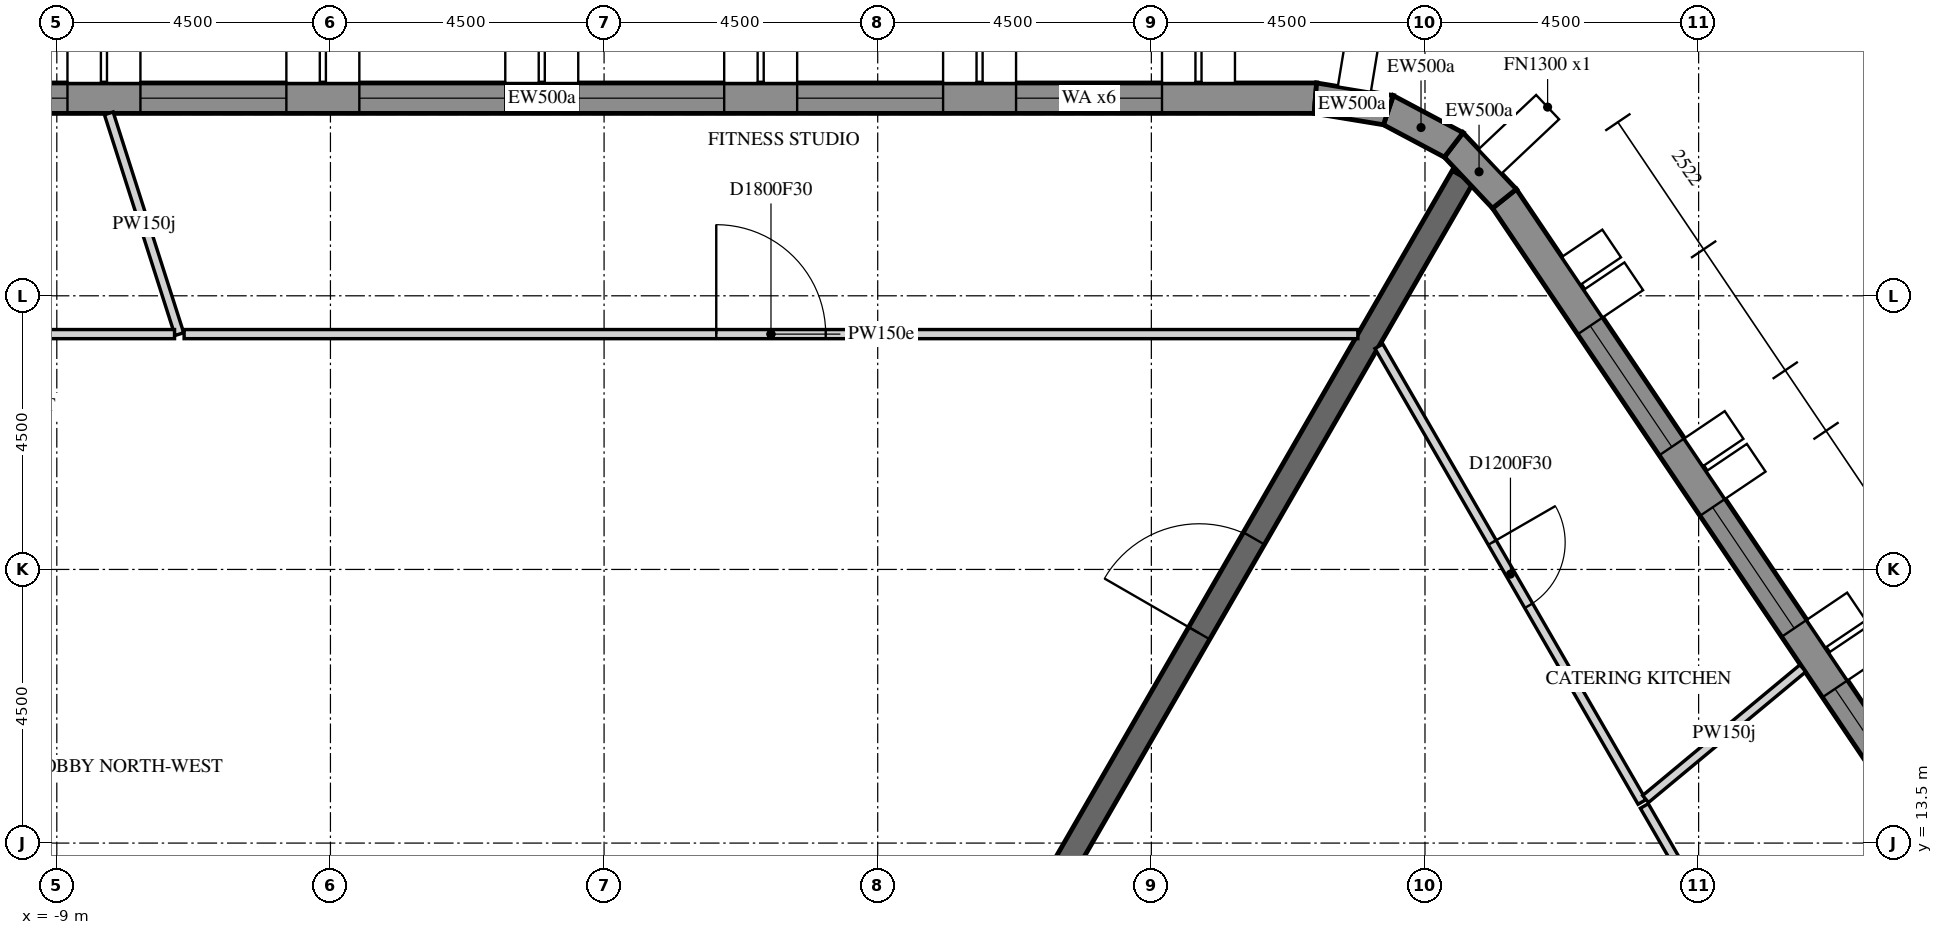
"""IFC4 building model, lengths in metres.
Left out: names, types, materials, properties, quantities, classifications, styles, units other than length and angle.
Written with IfcOpenShell. Run it as: python <this file> out.ifc"""

import sys

from ifc_helpers import new_model, si_unit, direction, frame, frame_2d, origin, place, context, subcontext, project, spatial, polyline, rectangle, outline, extrude, element, fill, save


model = new_model("IFC4")
c1 = context("Model", 3, precision=1e-05, world=origin(), true_north=direction((0.0, 1.0)))
c2 = subcontext(c1, "Body", "Model", "MODEL_VIEW")
j1 = project(units=[si_unit("LENGTHUNIT", "METRE"), si_unit("PLANEANGLEUNIT", "RADIAN")], contexts=[c1])
p1 = place(None, origin())
s1 = spatial("IfcSite", under=j1, at=p1, CompositionType="ELEMENT")
p2 = place(p1, origin())
s2 = spatial("IfcBuilding", under=s1, at=p2, CompositionType="ELEMENT")
p3 = place(p2, frame((0.0, 0.0, 338.1)))
s3 = spatial("IfcBuildingStorey", under=s2, at=p3, CompositionType="ELEMENT", Elevation=338.1)
p4 = place(p3, frame((11.698, 25.75, -0.3), z_axis=(0.0, 0.0, 1.0), x_axis=(-1.0, 0.0, 0.0)))
e1 = element("IfcWall", 1, at=p4, inside=s3, PredefinedType="SOLIDWALL", context=c2, shape_type="SweptSolid", body=[
    extrude(outline(polyline([(-0.021, -0.25), (25.468, -0.25), (25.421, 0.25), (0.021, 0.25), (-0.021, -0.25)])), origin(), (0.0, 0.0, 1.0), 5.4),
])
p5 = place(p4, frame((2.522, 0.0, 1.2)))
e2 = element("IfcOpeningElement", 2, at=p5, cuts=e1, PredefinedType="OPENING", context=c2, shape_type="SweptSolid", body=[
    extrude(rectangle(XDim=2.4, YDim=3.6, at=frame_2d((1.2, 1.8))), frame((0.0, 0.26, 0.0), z_axis=(0.0, -1.0, 0.0), x_axis=(1.0, 0.0, 0.0)), (0.0, 0.0, 1.0), 0.52),
])
p6 = place(p4, frame((6.122, 0.0, 1.2)))
e3 = element("IfcOpeningElement", 3, at=p6, cuts=e1, PredefinedType="OPENING", context=c2, shape_type="SweptSolid", body=[
    extrude(rectangle(XDim=2.4, YDim=3.6, at=frame_2d((1.2, 1.8))), frame((0.0, 0.26, 0.0), z_axis=(0.0, -1.0, 0.0), x_axis=(1.0, 0.0, 0.0)), (0.0, 0.0, 1.0), 0.52),
])
p7 = place(p4, frame((9.722, 0.0, 1.2)))
e4 = element("IfcOpeningElement", 4, at=p7, cuts=e1, PredefinedType="OPENING", context=c2, shape_type="SweptSolid", body=[
    extrude(rectangle(XDim=2.4, YDim=3.6, at=frame_2d((1.2, 1.8))), frame((0.0, 0.26, 0.0), z_axis=(0.0, -1.0, 0.0), x_axis=(1.0, 0.0, 0.0)), (0.0, 0.0, 1.0), 0.52),
])
p8 = place(p4, frame((13.323, 0.0, 1.2)))
e5 = element("IfcOpeningElement", 5, at=p8, cuts=e1, PredefinedType="OPENING", context=c2, shape_type="SweptSolid", body=[
    extrude(rectangle(XDim=2.4, YDim=3.6, at=frame_2d((1.2, 1.8))), frame((0.0, 0.26, 0.0), z_axis=(0.0, -1.0, 0.0), x_axis=(1.0, 0.0, 0.0)), (0.0, 0.0, 1.0), 0.52),
])
p9 = place(p4, frame((16.922, 0.0, 1.2)))
e6 = element("IfcOpeningElement", 6, at=p9, cuts=e1, PredefinedType="OPENING", context=c2, shape_type="SweptSolid", body=[
    extrude(rectangle(XDim=2.4, YDim=3.6, at=frame_2d((1.2, 1.8))), frame((0.0, 0.26, 0.0), z_axis=(0.0, -1.0, 0.0), x_axis=(1.0, 0.0, 0.0)), (0.0, 0.0, 1.0), 0.52),
])
p10 = place(p4, frame((20.522, 0.0, 1.2)))
e7 = element("IfcOpeningElement", 7, at=p10, cuts=e1, PredefinedType="OPENING", context=c2, shape_type="SweptSolid", body=[
    extrude(rectangle(XDim=2.4, YDim=3.6, at=frame_2d((1.2, 1.8))), frame((0.0, 0.26, 0.0), z_axis=(0.0, -1.0, 0.0), x_axis=(1.0, 0.0, 0.0)), (0.0, 0.0, 1.0), 0.52),
])
p11 = place(p3, frame((29.035, 3.002, -0.3), z_axis=(0.0, 0.0, 1.0), x_axis=(-0.559195809204, 0.829035612606, 0.0)))
e8 = element("IfcWall", 8, at=p11, inside=s3, PredefinedType="SOLIDWALL", context=c2, shape_type="SweptSolid", body=[
    extrude(outline(polyline([(-0.023, -0.25), (25.465, -0.25), (25.424, 0.25), (0.023, 0.25), (-0.023, -0.25)])), origin(), (0.0, 0.0, 1.0), 5.4),
])
p12 = place(p11, frame((2.522, 0.0, 1.2)))
e9 = element("IfcOpeningElement", 9, at=p12, cuts=e8, PredefinedType="OPENING", context=c2, shape_type="SweptSolid", body=[
    extrude(rectangle(XDim=2.4, YDim=3.6, at=frame_2d((1.2, 1.8))), frame((0.0, 0.26, 0.0), z_axis=(0.0, -1.0, 0.0), x_axis=(1.0, 0.0, 0.0)), (0.0, 0.0, 1.0), 0.52),
])
p13 = place(p11, frame((6.122, 0.0, 1.2)))
e10 = element("IfcOpeningElement", 10, at=p13, cuts=e8, PredefinedType="OPENING", context=c2, shape_type="SweptSolid", body=[
    extrude(rectangle(XDim=2.4, YDim=3.6, at=frame_2d((1.2, 1.8))), frame((0.0, 0.26, 0.0), z_axis=(0.0, -1.0, 0.0), x_axis=(1.0, 0.0, 0.0)), (0.0, 0.0, 1.0), 0.52),
])
p14 = place(p11, frame((9.722, 0.0, 1.2)))
e11 = element("IfcOpeningElement", 11, at=p14, cuts=e8, PredefinedType="OPENING", context=c2, shape_type="SweptSolid", body=[
    extrude(rectangle(XDim=2.4, YDim=3.6, at=frame_2d((1.2, 1.8))), frame((0.0, 0.26, 0.0), z_axis=(0.0, -1.0, 0.0), x_axis=(1.0, 0.0, 0.0)), (0.0, 0.0, 1.0), 0.52),
])
p15 = place(p11, frame((13.323, 0.0, 1.2)))
e12 = element("IfcOpeningElement", 12, at=p15, cuts=e8, PredefinedType="OPENING", context=c2, shape_type="SweptSolid", body=[
    extrude(rectangle(XDim=2.4, YDim=3.6, at=frame_2d((1.2, 1.8))), frame((0.0, 0.26, 0.0), z_axis=(0.0, -1.0, 0.0), x_axis=(1.0, 0.0, 0.0)), (0.0, 0.0, 1.0), 0.52),
])
p16 = place(p11, frame((16.922, 0.0, 1.2)))
e13 = element("IfcOpeningElement", 13, at=p16, cuts=e8, PredefinedType="OPENING", context=c2, shape_type="SweptSolid", body=[
    extrude(rectangle(XDim=2.4, YDim=3.6, at=frame_2d((1.2, 1.8))), frame((0.0, 0.26, 0.0), z_axis=(0.0, -1.0, 0.0), x_axis=(1.0, 0.0, 0.0)), (0.0, 0.0, 1.0), 0.52),
])
p17 = place(p11, frame((20.522, 0.0, 1.2)))
e14 = element("IfcOpeningElement", 14, at=p17, cuts=e8, PredefinedType="OPENING", context=c2, shape_type="SweptSolid", body=[
    extrude(rectangle(XDim=2.4, YDim=3.6, at=frame_2d((1.2, 1.8))), frame((0.0, 0.26, 0.0), z_axis=(0.0, -1.0, 0.0), x_axis=(1.0, 0.0, 0.0)), (0.0, 0.0, 1.0), 0.52),
])
p18 = place(p3, frame((14.806, 24.097, -0.3), z_axis=(0.0, 0.0, 1.0), x_axis=(-0.686234452793, 0.727380420275, 0.0)))
e15 = element("IfcWall", 15, at=p18, inside=s3, PredefinedType="SOLIDWALL", context=c2, shape_type="SweptSolid", body=[
    extrude(outline(polyline([(-0.021, -0.25), (1.257, -0.25), (1.175, 0.25), (0.021, 0.25), (-0.021, -0.25)])), origin(), (0.0, 0.0, 1.0), 5.4),
])
p19 = place(p3, frame((13.972, 24.982, -0.3), z_axis=(0.0, 0.0, 1.0), x_axis=(-0.882902492938, 0.469556373575, 0.0)))
e16 = element("IfcWall", 16, at=p19, inside=s3, PredefinedType="SOLIDWALL", context=c2, shape_type="SweptSolid", body=[
    extrude(outline(polyline([(-0.041, -0.25), (1.257, -0.25), (1.175, 0.25), (0.041, 0.25), (-0.041, -0.25)])), origin(), (0.0, 0.0, 1.0), 5.4),
])
p20 = place(p3, frame((12.898, 25.553, -0.3), z_axis=(0.0, 0.0, 1.0), x_axis=(-0.986765617372, 0.16215306464, 0.0)))
e17 = element("IfcWall", 17, at=p20, inside=s3, PredefinedType="SOLIDWALL", context=c2, shape_type="SweptSolid", body=[
    extrude(outline(polyline([(-0.041, -0.25), (1.237, -0.25), (1.196, 0.25), (0.041, 0.25), (-0.041, -0.25)])), origin(), (0.0, 0.0, 1.0), 5.4),
])
p21 = place(p3, frame((6.351, 11.0, -0.3), z_axis=(0.0, 0.0, 1.0), x_axis=(0.499998894578, 0.866026041999, 0.0)))
e18 = element("IfcWall", 18, at=p21, inside=s3, PredefinedType="SHEAR", context=c2, shape_type="SweptSolid", body=[
    extrude(rectangle(XDim=15.544, YDim=0.4, at=frame_2d((7.772, 0.0))), origin(), (0.0, 0.0, 1.0), 5.4),
])
p22 = place(p21, frame((6.872, 0.0, 0.3)))
e19 = element("IfcOpeningElement", 19, at=p22, cuts=e18, PredefinedType="OPENING", context=c2, shape_type="SweptSolid", body=[
    extrude(rectangle(XDim=1.8, YDim=2.4, at=frame_2d((0.9, 1.2))), frame((0.0, 0.21, 0.0), z_axis=(0.0, -1.0, 0.0), x_axis=(1.0, 0.0, 0.0)), (0.0, 0.0, 1.0), 0.42),
])
p23 = place(p3, frame((-8.145, 25.5, 0.0), z_axis=(0.0, 0.0, 1.0), x_axis=(0.304382836825, -0.952549782765, 0.0)))
e20 = element("IfcWall", 20, at=p23, inside=s3, PredefinedType="PARTITIONING", context=c2, shape_type="SweptSolid", body=[
    extrude(rectangle(XDim=3.811, YDim=0.15, at=frame_2d((1.905, 0.0))), origin(), (0.0, 0.0, 1.0), 4.346),
])
p24 = place(p3, frame((-7.064, 21.87, 0.0), z_axis=(0.0, 0.0, 1.0), x_axis=(-1.0, 0.0, 0.0)))
e21 = element("IfcWall", 21, at=p24, inside=s3, PredefinedType="PARTITIONING", context=c2, shape_type="SweptSolid", body=[
    extrude(rectangle(XDim=5.477, YDim=0.15, at=frame_2d((2.738, 0.0))), origin(), (0.0, 0.0, 1.0), 5.1),
])
p25 = place(p3, frame((-6.906, 21.87, 0.0), z_axis=(0.0, 0.0, 1.0), x_axis=(1.0, 0.0, 0.0)))
e22 = element("IfcWall", 22, at=p25, inside=s3, PredefinedType="PARTITIONING", context=c2, shape_type="SweptSolid", body=[
    extrude(rectangle(XDim=19.302, YDim=0.15, at=frame_2d((9.651, 0.0))), origin(), (0.0, 0.0, 1.0), 5.1),
])
p26 = place(p25, frame((8.751, 0.0, 0.0)))
e23 = element("IfcOpeningElement", 23, at=p26, cuts=e22, PredefinedType="OPENING", context=c2, shape_type="SweptSolid", body=[
    extrude(rectangle(XDim=1.8, YDim=2.1, at=frame_2d((0.9, 1.05))), frame((0.0, 0.085, 0.0), z_axis=(0.0, -1.0, 0.0), x_axis=(1.0, 0.0, 0.0)), (0.0, 0.0, 1.0), 0.17),
])
p27 = place(p3, frame((12.742, 21.67, 0.0), z_axis=(0.0, 0.0, 1.0), x_axis=(0.500047259291, -0.865998116901, 0.0)))
e24 = element("IfcWall", 24, at=p27, inside=s3, PredefinedType="PARTITIONING", context=c2, shape_type="SweptSolid", body=[
    extrude(rectangle(XDim=8.654, YDim=0.15, at=frame_2d((4.327, 0.0))), origin(), (0.0, 0.0, 1.0), 5.1),
])
p28 = place(p27, frame((3.727, 0.0, 0.0)))
e25 = element("IfcOpeningElement", 25, at=p28, cuts=e24, PredefinedType="OPENING", context=c2, shape_type="SweptSolid", body=[
    extrude(rectangle(XDim=1.2, YDim=2.1, at=frame_2d((0.6, 1.05))), frame((0.0, 0.085, 0.0), z_axis=(0.0, -1.0, 0.0), x_axis=(1.0, 0.0, 0.0)), (0.0, 0.0, 1.0), 0.17),
])
p29 = place(p3, frame((19.714, 16.374, 0.0), z_axis=(0.0, 0.0, 1.0), x_axis=(-0.769119005656, -0.639105589976, 0.0)))
e26 = element("IfcWall", 26, at=p29, inside=s3, PredefinedType="PARTITIONING", context=c2, shape_type="SweptSolid", body=[
    extrude(rectangle(XDim=3.363, YDim=0.15, at=frame_2d((1.682, 0.0))), origin(), (0.0, 0.0, 1.0), 4.346),
])
p30 = place(p3, frame((17.107, 14.11, 0.0), z_axis=(0.0, 0.0, 1.0), x_axis=(0.499976943081, -0.866038715293, 0.0)))
e27 = element("IfcWall", 27, at=p30, inside=s3, PredefinedType="PARTITIONING", context=c2, shape_type="SweptSolid", body=[
    extrude(rectangle(XDim=6.034, YDim=0.15, at=frame_2d((3.017, 0.0))), origin(), (0.0, 0.0, 1.0), 5.1),
])
p31 = place(p30, frame((2.517, 0.0, 0.0)))
e28 = element("IfcOpeningElement", 28, at=p31, cuts=e27, PredefinedType="OPENING", context=c2, shape_type="SweptSolid", body=[
    extrude(rectangle(XDim=1.0, YDim=2.1, at=frame_2d((0.5, 1.05))), frame((0.0, 0.085, 0.0), z_axis=(0.0, -1.0, 0.0), x_axis=(1.0, 0.0, 0.0)), (0.0, 0.0, 1.0), 0.17),
])
p32 = place(p5, frame((0.0, 0.18, 0.0)))
e29 = element("IfcWindow", 29, at=p32, inside=s3, PartitioningType="DOUBLE_PANEL_VERTICAL", PredefinedType="WINDOW", context=c2, shape_type="SweptSolid", body=[
    extrude(rectangle(XDim=2.4, YDim=3.6, at=frame_2d((1.2, 1.8))), frame((0.0, 0.03, 0.0), z_axis=(0.0, -1.0, 0.0), x_axis=(1.0, 0.0, 0.0)), (0.0, 0.0, 1.0), 0.06),
])
fill(e2, e29)
p33 = place(p6, frame((0.0, 0.18, 0.0)))
e30 = element("IfcWindow", 30, at=p33, inside=s3, PartitioningType="DOUBLE_PANEL_VERTICAL", PredefinedType="WINDOW", context=c2, shape_type="SweptSolid", body=[
    extrude(rectangle(XDim=2.4, YDim=3.6, at=frame_2d((1.2, 1.8))), frame((0.0, 0.03, 0.0), z_axis=(0.0, -1.0, 0.0), x_axis=(1.0, 0.0, 0.0)), (0.0, 0.0, 1.0), 0.06),
])
fill(e3, e30)
p34 = place(p7, frame((0.0, 0.18, 0.0)))
e31 = element("IfcWindow", 31, at=p34, inside=s3, PartitioningType="DOUBLE_PANEL_VERTICAL", PredefinedType="WINDOW", context=c2, shape_type="SweptSolid", body=[
    extrude(rectangle(XDim=2.4, YDim=3.6, at=frame_2d((1.2, 1.8))), frame((0.0, 0.03, 0.0), z_axis=(0.0, -1.0, 0.0), x_axis=(1.0, 0.0, 0.0)), (0.0, 0.0, 1.0), 0.06),
])
fill(e4, e31)
p35 = place(p8, frame((0.0, 0.18, 0.0)))
e32 = element("IfcWindow", 32, at=p35, inside=s3, PartitioningType="DOUBLE_PANEL_VERTICAL", PredefinedType="WINDOW", context=c2, shape_type="SweptSolid", body=[
    extrude(rectangle(XDim=2.4, YDim=3.6, at=frame_2d((1.2, 1.8))), frame((0.0, 0.03, 0.0), z_axis=(0.0, -1.0, 0.0), x_axis=(1.0, 0.0, 0.0)), (0.0, 0.0, 1.0), 0.06),
])
fill(e5, e32)
p36 = place(p9, frame((0.0, 0.18, 0.0)))
e33 = element("IfcWindow", 33, at=p36, inside=s3, PartitioningType="DOUBLE_PANEL_VERTICAL", PredefinedType="WINDOW", context=c2, shape_type="SweptSolid", body=[
    extrude(rectangle(XDim=2.4, YDim=3.6, at=frame_2d((1.2, 1.8))), frame((0.0, 0.03, 0.0), z_axis=(0.0, -1.0, 0.0), x_axis=(1.0, 0.0, 0.0)), (0.0, 0.0, 1.0), 0.06),
])
fill(e6, e33)
p37 = place(p10, frame((0.0, 0.18, 0.0)))
e34 = element("IfcWindow", 34, at=p37, inside=s3, PartitioningType="DOUBLE_PANEL_VERTICAL", PredefinedType="WINDOW", context=c2, shape_type="SweptSolid", body=[
    extrude(rectangle(XDim=2.4, YDim=3.6, at=frame_2d((1.2, 1.8))), frame((0.0, 0.03, 0.0), z_axis=(0.0, -1.0, 0.0), x_axis=(1.0, 0.0, 0.0)), (0.0, 0.0, 1.0), 0.06),
])
fill(e7, e34)
p38 = place(p15, frame((0.0, 0.18, 0.0)))
e35 = element("IfcWindow", 35, at=p38, inside=s3, PartitioningType="DOUBLE_PANEL_VERTICAL", PredefinedType="WINDOW", context=c2, shape_type="SweptSolid", body=[
    extrude(rectangle(XDim=2.4, YDim=3.6, at=frame_2d((1.2, 1.8))), frame((0.0, 0.03, 0.0), z_axis=(0.0, -1.0, 0.0), x_axis=(1.0, 0.0, 0.0)), (0.0, 0.0, 1.0), 0.06),
])
fill(e12, e35)
p39 = place(p16, frame((0.0, 0.18, 0.0)))
e36 = element("IfcWindow", 36, at=p39, inside=s3, PartitioningType="DOUBLE_PANEL_VERTICAL", PredefinedType="WINDOW", context=c2, shape_type="SweptSolid", body=[
    extrude(rectangle(XDim=2.4, YDim=3.6, at=frame_2d((1.2, 1.8))), frame((0.0, 0.03, 0.0), z_axis=(0.0, -1.0, 0.0), x_axis=(1.0, 0.0, 0.0)), (0.0, 0.0, 1.0), 0.06),
])
fill(e13, e36)
p40 = place(p17, frame((0.0, 0.18, 0.0)))
e37 = element("IfcWindow", 37, at=p40, inside=s3, PartitioningType="DOUBLE_PANEL_VERTICAL", PredefinedType="WINDOW", context=c2, shape_type="SweptSolid", body=[
    extrude(rectangle(XDim=2.4, YDim=3.6, at=frame_2d((1.2, 1.8))), frame((0.0, 0.03, 0.0), z_axis=(0.0, -1.0, 0.0), x_axis=(1.0, 0.0, 0.0)), (0.0, 0.0, 1.0), 0.06),
])
fill(e14, e37)
p41 = place(p22, origin())
e38 = element("IfcDoor", 38, at=p41, inside=s3, OperationType="DOUBLE_DOOR_SINGLE_SWING", PredefinedType="DOOR", context=c2, shape_type="SweptSolid", body=[
    extrude(rectangle(XDim=1.8, YDim=2.4, at=frame_2d((0.9, 1.2))), frame((0.0, 0.025, 0.0), z_axis=(0.0, -1.0, 0.0), x_axis=(1.0, 0.0, 0.0)), (0.0, 0.0, 1.0), 0.05),
])
fill(e19, e38)
p42 = place(p26, origin())
e39 = element("IfcDoor", 39, at=p42, inside=s3, OperationType="DOUBLE_DOOR_SINGLE_SWING", PredefinedType="DOOR", context=c2, shape_type="SweptSolid", body=[
    extrude(rectangle(XDim=1.8, YDim=2.1, at=frame_2d((0.9, 1.05))), frame((0.0, 0.025, 0.0), z_axis=(0.0, -1.0, 0.0), x_axis=(1.0, 0.0, 0.0)), (0.0, 0.0, 1.0), 0.05),
])
fill(e23, e39)
p43 = place(p28, origin())
e40 = element("IfcDoor", 40, at=p43, inside=s3, OperationType="SINGLE_SWING_LEFT", PredefinedType="DOOR", context=c2, shape_type="SweptSolid", body=[
    extrude(rectangle(XDim=1.2, YDim=2.1, at=frame_2d((0.6, 1.05))), frame((0.0, 0.025, 0.0), z_axis=(0.0, -1.0, 0.0), x_axis=(1.0, 0.0, 0.0)), (0.0, 0.0, 1.0), 0.05),
])
fill(e25, e40)
save(model, sys.argv[1])
